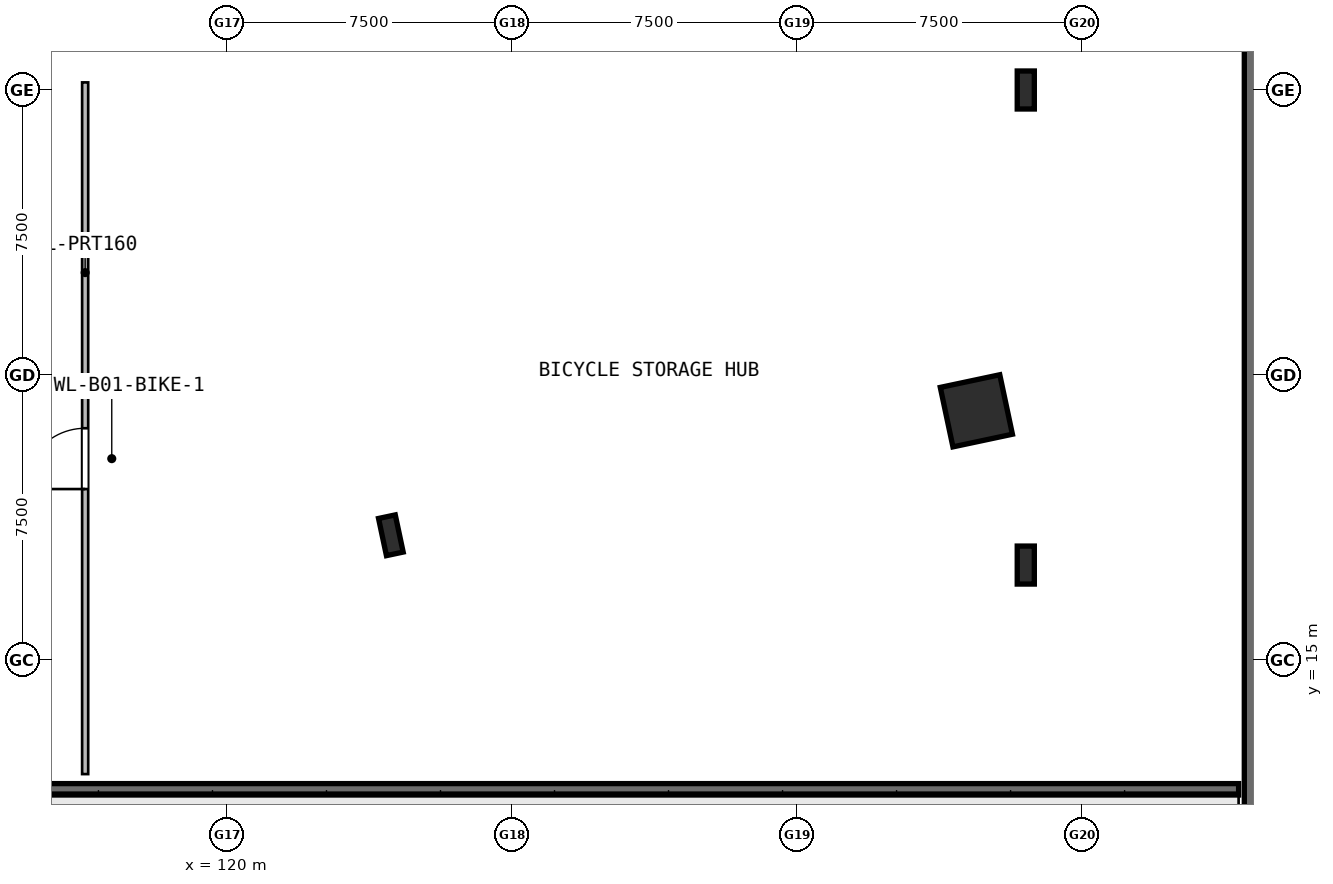
"""IFC4 building model, lengths in metres.
Left out: names, types, materials, properties, quantities, classifications, styles, units other than length and angle.
Written with IfcOpenShell. Run it as: python <this file> out.ifc"""

import sys

from ifc_helpers import new_model, si_unit, direction, frame, frame_2d, origin, origin_2d, place, context, subcontext, project, spatial, rectangle, hollow_rectangle, i_section, extrude, element, fill, save


model = new_model("IFC4")
c1 = context("Model", 3, precision=1e-05, world=origin(), true_north=direction((0.0, 1.0)))
c2 = subcontext(c1, "Body", "Model", "MODEL_VIEW")
j1 = project(units=[si_unit("LENGTHUNIT", "METRE"), si_unit("PLANEANGLEUNIT", "RADIAN")], contexts=[c1])
p1 = place(None, origin())
s1 = spatial("IfcSite", under=j1, at=p1, CompositionType="ELEMENT")
p2 = place(p1, origin())
s2 = spatial("IfcBuilding", under=s1, at=p2, CompositionType="ELEMENT")
p3 = place(p2, frame((0.0, 0.0, -5.4)))
s3 = spatial("IfcBuildingStorey", under=s2, at=p3, CompositionType="ELEMENT", Elevation=-5.4)
p4 = place(p3, frame((147.0, 3.0, 0.0), z_axis=(0.0, 0.0, 1.0), x_axis=(0.0, 1.0, 0.0)))
e1 = element("IfcWall", 1, at=p4, inside=s3, PredefinedType="SOLIDWALL", context=c2, shape_type="SweptSolid", body=[
    extrude(rectangle(XDim=54.0, YDim=0.5, at=frame_2d((27.0, 0.0))), origin(), (0.0, 0.0, 1.0), 5.4),
])
p5 = place(p3, frame((124.294, 18.284, 0.0), z_axis=(0.0, 0.0, 1.0), x_axis=(0.978147600734, 0.207911690818, 0.0)))
e2 = element("IfcColumn", 2, at=p5, inside=s3, PredefinedType="COLUMN", context=c2, shape_type="SweptSolid", body=[
    extrude(i_section(OverallWidth=0.45, OverallDepth=1.0, WebThickness=0.022, FlangeThickness=0.04, at=origin_2d()), origin(), (0.0, 0.0, 1.0), 5.4),
])
p6 = place(p3, frame((139.699, 21.559, 0.0), z_axis=(0.0, 0.0, 1.0), x_axis=(0.978147600734, 0.207911690818, 0.0)))
e3 = element("IfcColumn", 3, at=p6, inside=s3, PredefinedType="COLUMN", context=c2, shape_type="SweptSolid", body=[
    extrude(hollow_rectangle(XDim=1.6, YDim=1.6, WallThickness=0.04, at=origin_2d()), origin(), (0.0, 0.0, 1.0), 5.4),
])
for number, where, z_axis, x_axis in (
    (4, (141.0, 17.5, 0.0), (0.0, 0.0, 1.0), (1.0, 0.0, 0.0)),
    (5, (141.0, 30.0, 0.0), (0.0, 0.0, 1.0), (1.0, 0.0, 0.0)),
):
    element("IfcColumn", number, at=place(p3, frame(where, z_axis=z_axis, x_axis=x_axis)), inside=s3, PredefinedType="COLUMN", context=c2, shape_type="SweptSolid", body=[
        extrude(i_section(OverallWidth=0.45, OverallDepth=1.0, WebThickness=0.022, FlangeThickness=0.04, at=origin_2d()), origin(), (0.0, 0.0, 1.0), 5.4),
    ])
p7 = place(p3, frame((101.6, 11.6, 0.0), z_axis=(0.0, 0.0, 1.0), x_axis=(1.0, 0.0, 0.0)))
e6 = element("IfcWall", 6, at=p7, inside=s3, PredefinedType="SOLIDWALL", context=c2, shape_type="SweptSolid", body=[
    extrude(rectangle(XDim=45.0, YDim=0.3, at=frame_2d((22.5, 0.0))), origin(), (0.0, 0.0, 1.0), 5.4),
])
p8 = place(p3, frame((116.25, 12.0, 0.0), z_axis=(0.0, 0.0, 1.0), x_axis=(0.0, 1.0, 0.0)))
e7 = element("IfcWall", 7, at=p8, inside=s3, PredefinedType="PARTITIONING", context=c2, shape_type="SweptSolid", body=[
    extrude(rectangle(XDim=18.2, YDim=0.16, at=frame_2d((9.1, 0.0))), origin(), (0.0, 0.0, 1.0), 5.08),
])
p9 = place(p8, frame((7.5, 0.0, 0.0)))
e8 = element("IfcOpeningElement", 8, at=p9, cuts=e7, PredefinedType="OPENING", context=c2, shape_type="SweptSolid", body=[
    extrude(rectangle(XDim=1.6, YDim=2.2, at=frame_2d((0.8, 1.1))), frame((0.0, 0.09, 0.0), z_axis=(0.0, -1.0, 0.0), x_axis=(1.0, 0.0, 0.0)), (0.0, 0.0, 1.0), 0.18),
])
p10 = place(p9, origin())
e9 = element("IfcDoor", 9, at=p10, inside=s3, OperationType="DOUBLE_DOOR_SINGLE_SWING", PredefinedType="DOOR", context=c2, shape_type="SweptSolid", body=[
    extrude(rectangle(XDim=1.6, YDim=2.2, at=frame_2d((0.8, 1.1))), frame((0.0, 0.025, 0.0), z_axis=(0.0, -1.0, 0.0), x_axis=(1.0, 0.0, 0.0)), (0.0, 0.0, 1.0), 0.05),
])
fill(e8, e9)
save(model, sys.argv[1])
